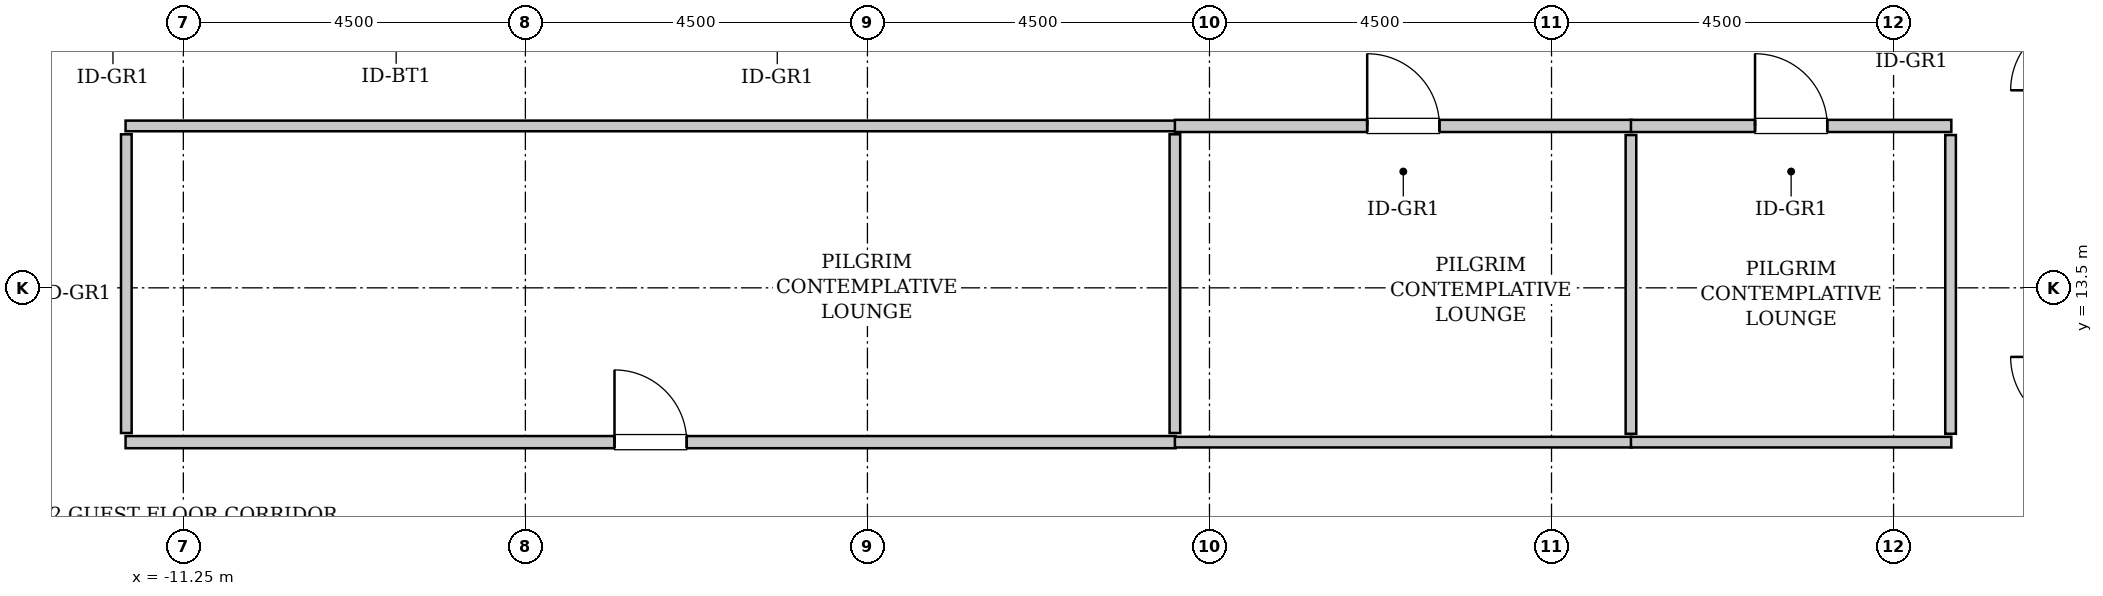
"""IFC4 building model, lengths in metres.
Left out: names, types, materials, properties, quantities, classifications, styles, units other than length and angle.
Written with IfcOpenShell. Run it as: python <this file> out.ifc"""

import sys

from ifc_helpers import new_model, si_unit, direction, frame, frame_2d, origin, place, context, subcontext, project, spatial, rectangle, extrude, source, transform, mapped, element, fill, save


model = new_model("IFC4")
c1 = context("Model", 3, precision=1e-05, world=origin(), true_north=direction((0.0, 1.0)))
c2 = subcontext(c1, "Body", "Model", "MODEL_VIEW")
j1 = project(units=[si_unit("LENGTHUNIT", "METRE"), si_unit("PLANEANGLEUNIT", "RADIAN")], contexts=[c1])
p1 = place(None, origin())
s1 = spatial("IfcSite", under=j1, at=p1, CompositionType="ELEMENT")
p2 = place(p1, origin())
s2 = spatial("IfcBuilding", under=s1, at=p2, CompositionType="ELEMENT")
p3 = place(p2, frame((0.0, 0.0, 171.6)))
s3 = spatial("IfcBuildingStorey", under=s2, at=p3, CompositionType="ELEMENT", Elevation=171.6)
m1 = source(origin(), c2, "Body", "SweptSolid", [
    extrude(rectangle(XDim=13.815, YDim=0.16, at=frame_2d((6.907, 0.0))), origin(), (0.0, 0.0, 1.0), 3.535),
])
p4 = place(p3, frame((-12.01, 11.47, 0.0), z_axis=(0.0, 0.0, 1.0), x_axis=(1.0, 0.0, 0.0)))
e1 = element("IfcWall", 1, at=p4, inside=s3, PredefinedType="PARTITIONING", context=c2, shape_type="MappedRepresentation", body=[
    mapped(m1, transform((0.0, 0.0, 0.0), x_axis=(1.0, 0.0, 0.0), y_axis=(0.0, 1.0, 0.0), z_axis=(0.0, 0.0, 1.0), scale=1.0)),
])
p5 = place(p4, frame((6.433, 0.0, 0.0)))
e2 = element("IfcOpeningElement", 2, at=p5, cuts=e1, PredefinedType="OPENING", context=c2, shape_type="SweptSolid", body=[
    extrude(rectangle(XDim=0.95, YDim=2.1, at=frame_2d((0.475, 1.05))), frame((0.0, 0.09, 0.0), z_axis=(0.0, -1.0, 0.0), x_axis=(1.0, 0.0, 0.0)), (0.0, 0.0, 1.0), 0.18),
])
m2 = source(origin(), c2, "Body", "SweptSolid", [
    extrude(rectangle(XDim=13.815, YDim=0.14, at=frame_2d((6.907, 0.0))), origin(), (0.0, 0.0, 1.0), 3.535),
])
p6 = place(p3, frame((-12.01, 15.63, 0.0), z_axis=(0.0, 0.0, 1.0), x_axis=(1.0, 0.0, 0.0)))
e3 = element("IfcWall", 3, at=p6, inside=s3, PredefinedType="PARTITIONING", context=c2, shape_type="MappedRepresentation", body=[
    mapped(m2, transform((0.0, 0.0, 0.0), x_axis=(1.0, 0.0, 0.0), y_axis=(0.0, 1.0, 0.0), z_axis=(0.0, 0.0, 1.0), scale=1.0)),
])
m3 = source(origin(), c2, "Body", "SweptSolid", [
    extrude(rectangle(XDim=3.93, YDim=0.14, at=frame_2d((1.965, 0.0))), origin(), (0.0, 0.0, 1.0), 3.535),
])
for number, where, z_axis, x_axis in (
    (4, (-12.0, 11.59, 0.0), (0.0, 0.0, 1.0), (0.0, 1.0, 0.0)),
    (5, (1.795, 11.59, 0.0), (0.0, 0.0, 1.0), (0.0, 1.0, 0.0)),
):
    element("IfcWall", number, at=place(p3, frame(where, z_axis=z_axis, x_axis=x_axis)), inside=s3, PredefinedType="PARTITIONING", context=c2, shape_type="MappedRepresentation", body=[
        mapped(m3, transform((0.0, 0.0, 0.0), x_axis=(1.0, 0.0, 0.0), y_axis=(0.0, 1.0, 0.0), z_axis=(0.0, 0.0, 1.0), scale=1.0)),
    ])
m4 = source(origin(), c2, "Body", "SweptSolid", [
    extrude(rectangle(XDim=6.01, YDim=0.16, at=frame_2d((3.005, 0.0))), origin(), (0.0, 0.0, 1.0), 3.535),
])
p7 = place(p3, frame((1.795, 15.63, 0.0), z_axis=(0.0, 0.0, 1.0), x_axis=(1.0, 0.0, 0.0)))
e6 = element("IfcWall", 6, at=p7, inside=s3, PredefinedType="PARTITIONING", context=c2, shape_type="MappedRepresentation", body=[
    mapped(m4, transform((0.0, 0.0, 0.0), x_axis=(1.0, 0.0, 0.0), y_axis=(0.0, 1.0, 0.0), z_axis=(0.0, 0.0, 1.0), scale=1.0)),
])
p8 = place(p7, frame((2.53, 0.0, 0.0)))
e7 = element("IfcOpeningElement", 7, at=p8, cuts=e6, PredefinedType="OPENING", context=c2, shape_type="SweptSolid", body=[
    extrude(rectangle(XDim=0.95, YDim=2.1, at=frame_2d((0.475, 1.05))), frame((0.0, 0.09, 0.0), z_axis=(0.0, -1.0, 0.0), x_axis=(1.0, 0.0, 0.0)), (0.0, 0.0, 1.0), 0.18),
])
m5 = source(origin(), c2, "Body", "SweptSolid", [
    extrude(rectangle(XDim=6.01, YDim=0.14, at=frame_2d((3.005, 0.0))), origin(), (0.0, 0.0, 1.0), 3.535),
])
p9 = place(p3, frame((1.795, 11.47, 0.0), z_axis=(0.0, 0.0, 1.0), x_axis=(1.0, 0.0, 0.0)))
e8 = element("IfcWall", 8, at=p9, inside=s3, PredefinedType="PARTITIONING", context=c2, shape_type="MappedRepresentation", body=[
    mapped(m5, transform((0.0, 0.0, 0.0), x_axis=(1.0, 0.0, 0.0), y_axis=(0.0, 1.0, 0.0), z_axis=(0.0, 0.0, 1.0), scale=1.0)),
])
p10 = place(p3, frame((7.795, 11.58, 0.0), z_axis=(0.0, 0.0, 1.0), x_axis=(0.0, 1.0, 0.0)))
e9 = element("IfcWall", 9, at=p10, inside=s3, PredefinedType="PARTITIONING", context=c2, shape_type="MappedRepresentation", body=[
    mapped(m3, transform((0.0, 0.0, 0.0), x_axis=(1.0, 0.0, 0.0), y_axis=(0.0, 1.0, 0.0), z_axis=(0.0, 0.0, 1.0), scale=1.0)),
])
m6 = source(origin(), c2, "Body", "SweptSolid", [
    extrude(rectangle(XDim=4.215, YDim=0.16, at=frame_2d((2.107, 0.0))), origin(), (0.0, 0.0, 1.0), 3.535),
])
p11 = place(p3, frame((7.795, 15.63, 0.0), z_axis=(0.0, 0.0, 1.0), x_axis=(1.0, 0.0, 0.0)))
e10 = element("IfcWall", 10, at=p11, inside=s3, PredefinedType="PARTITIONING", context=c2, shape_type="MappedRepresentation", body=[
    mapped(m6, transform((0.0, 0.0, 0.0), x_axis=(1.0, 0.0, 0.0), y_axis=(0.0, 1.0, 0.0), z_axis=(0.0, 0.0, 1.0), scale=1.0)),
])
p12 = place(p11, frame((1.633, 0.0, 0.0)))
e11 = element("IfcOpeningElement", 11, at=p12, cuts=e10, PredefinedType="OPENING", context=c2, shape_type="SweptSolid", body=[
    extrude(rectangle(XDim=0.95, YDim=2.1, at=frame_2d((0.475, 1.05))), frame((0.0, 0.09, 0.0), z_axis=(0.0, -1.0, 0.0), x_axis=(1.0, 0.0, 0.0)), (0.0, 0.0, 1.0), 0.18),
])
m7 = source(origin(), c2, "Body", "SweptSolid", [
    extrude(rectangle(XDim=4.215, YDim=0.14, at=frame_2d((2.107, 0.0))), origin(), (0.0, 0.0, 1.0), 3.535),
])
p13 = place(p3, frame((7.795, 11.47, 0.0), z_axis=(0.0, 0.0, 1.0), x_axis=(1.0, 0.0, 0.0)))
e12 = element("IfcWall", 12, at=p13, inside=s3, PredefinedType="PARTITIONING", context=c2, shape_type="MappedRepresentation", body=[
    mapped(m7, transform((0.0, 0.0, 0.0), x_axis=(1.0, 0.0, 0.0), y_axis=(0.0, 1.0, 0.0), z_axis=(0.0, 0.0, 1.0), scale=1.0)),
])
p14 = place(p3, frame((12.0, 11.58, 0.0), z_axis=(0.0, 0.0, 1.0), x_axis=(0.0, 1.0, 0.0)))
e13 = element("IfcWall", 13, at=p14, inside=s3, PredefinedType="PARTITIONING", context=c2, shape_type="MappedRepresentation", body=[
    mapped(m3, transform((0.0, 0.0, 0.0), x_axis=(1.0, 0.0, 0.0), y_axis=(0.0, 1.0, 0.0), z_axis=(0.0, 0.0, 1.0), scale=1.0)),
])
m8 = source(origin(), c2, "Body", "SweptSolid", [
    extrude(rectangle(XDim=0.95, YDim=2.1, at=frame_2d((0.475, 1.05))), frame((0.0, 0.025, 0.0), z_axis=(0.0, -1.0, 0.0), x_axis=(1.0, 0.0, 0.0)), (0.0, 0.0, 1.0), 0.05),
])
p15 = place(p5, origin())
e14 = element("IfcDoor", 14, at=p15, inside=s3, OperationType="SINGLE_SWING_LEFT", PredefinedType="DOOR", context=c2, shape_type="MappedRepresentation", body=[
    mapped(m8, transform((0.0, 0.0, 0.0), x_axis=(1.0, 0.0, 0.0), y_axis=(0.0, 1.0, 0.0), z_axis=(0.0, 0.0, 1.0), scale=1.0)),
])
fill(e2, e14)
p16 = place(p8, origin())
e15 = element("IfcDoor", 15, at=p16, inside=s3, OperationType="SINGLE_SWING_LEFT", PredefinedType="DOOR", context=c2, shape_type="MappedRepresentation", body=[
    mapped(m8, transform((0.0, 0.0, 0.0), x_axis=(1.0, 0.0, 0.0), y_axis=(0.0, 1.0, 0.0), z_axis=(0.0, 0.0, 1.0), scale=1.0)),
])
fill(e7, e15)
p17 = place(p12, origin())
e16 = element("IfcDoor", 16, at=p17, inside=s3, OperationType="SINGLE_SWING_LEFT", PredefinedType="DOOR", context=c2, shape_type="MappedRepresentation", body=[
    mapped(m8, transform((0.0, 0.0, 0.0), x_axis=(1.0, 0.0, 0.0), y_axis=(0.0, 1.0, 0.0), z_axis=(0.0, 0.0, 1.0), scale=1.0)),
])
fill(e11, e16)
save(model, sys.argv[1])
